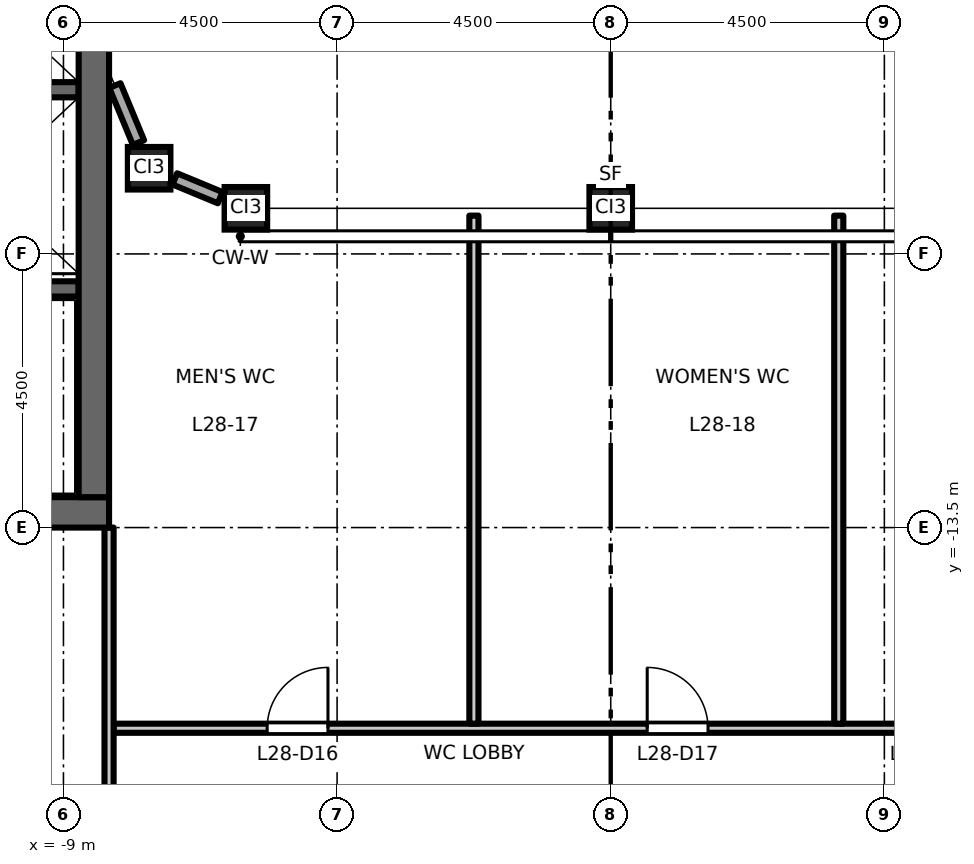
"""IFC4 building model, lengths in metres.
Left out: names, types, materials, properties, quantities, classifications, styles, units other than length and angle.
Written with IfcOpenShell. Run it as: python <this file> out.ifc"""

import sys

from ifc_helpers import new_model, si_unit, direction, frame, frame_2d, origin, origin_2d, place, context, subcontext, project, spatial, rectangle, hollow_rectangle, extrude, element, fill, save


model = new_model("IFC4")
c1 = context("Model", 3, precision=1e-05, world=origin(), true_north=direction((0.0, 1.0)))
c2 = subcontext(c1, "Body", "Model", "MODEL_VIEW")
j1 = project(units=[si_unit("LENGTHUNIT", "METRE"), si_unit("PLANEANGLEUNIT", "RADIAN")], contexts=[c1])
p1 = place(None, origin())
s1 = spatial("IfcSite", under=j1, at=p1, CompositionType="ELEMENT")
p2 = place(p1, origin())
s2 = spatial("IfcBuilding", under=s1, at=p2, CompositionType="ELEMENT")
p3 = place(p2, frame((0.0, 0.0, 131.7)))
s3 = spatial("IfcBuildingStorey", under=s2, at=p3, CompositionType="ELEMENT", Elevation=131.7)
for number, where, z_axis, x_axis in (
    (1, (-7.591, -7.591, 0.0), (0.0, 0.0, 1.0), (1.0, 0.0, 0.0)),
    (2, (-6.0, -8.25, 0.0), (0.0, 0.0, 1.0), (1.0, 0.0, 0.0)),
    (3, (0.0, -8.25, 0.0), (0.0, 0.0, 1.0), (1.0, 0.0, 0.0)),
):
    element("IfcColumn", number, at=place(p3, frame(where, z_axis=z_axis, x_axis=x_axis)), inside=s3, PredefinedType="COLUMN", context=c2, shape_type="SweptSolid", body=[
        extrude(hollow_rectangle(XDim=0.7, YDim=0.7, WallThickness=0.04, at=origin_2d()), origin(), (0.0, 0.0, 1.0), 4.5),
    ])
p4 = place(p3, frame((-8.75, -6.3, 0.0), z_axis=(0.0, 0.0, 1.0), x_axis=(-1.0, 0.0, 0.0)))
e4 = element("IfcWall", 4, at=p4, inside=s3, PredefinedType="SHEAR", context=c2, shape_type="SweptSolid", body=[
    extrude(rectangle(XDim=3.1, YDim=0.25, at=frame_2d((1.55, 0.0))), origin(), (0.0, 0.0, 1.0), 4.35),
])
p5 = place(p3, frame((-8.75, -9.575, 0.0), z_axis=(0.0, 0.0, 1.0), x_axis=(-1.0, 0.0, 0.0)))
e5 = element("IfcWall", 5, at=p5, inside=s3, PredefinedType="SHEAR", context=c2, shape_type="SweptSolid", body=[
    extrude(rectangle(XDim=8.0, YDim=0.25, at=frame_2d((4.0, 0.0))), origin(), (0.0, 0.0, 1.0), 4.35),
])
p6 = place(p5, frame((6.65, 0.0, 0.0)))
e6 = element("IfcOpeningElement", 6, at=p6, cuts=e5, PredefinedType="OPENING", context=c2, shape_type="SweptSolid", body=[
    extrude(rectangle(XDim=1.1, YDim=2.1, at=frame_2d((0.55, 1.05))), frame((0.0, 0.135, 0.0), z_axis=(0.0, -1.0, 0.0), x_axis=(1.0, 0.0, 0.0)), (0.0, 0.0, 1.0), 0.27),
])
p7 = place(p3, frame((-8.25, -13.25, 0.0), z_axis=(0.0, 0.0, 1.0), x_axis=(-1.0, 0.0, 0.0)))
e7 = element("IfcWall", 7, at=p7, inside=s3, PredefinedType="SHEAR", context=c2, shape_type="SweptSolid", body=[
    extrude(rectangle(XDim=13.5, YDim=0.5, at=frame_2d((6.75, 0.0))), origin(), (0.0, 0.0, 1.0), 4.35),
])
p8 = place(p3, frame((-8.5, -13.0, 0.0), z_axis=(0.0, 0.0, 1.0), x_axis=(0.0, 1.0, 0.0)))
e8 = element("IfcWall", 8, at=p8, inside=s3, PredefinedType="SHEAR", context=c2, shape_type="SweptSolid", body=[
    extrude(rectangle(XDim=26.0, YDim=0.5, at=frame_2d((13.0, 0.0))), origin(), (0.0, 0.0, 1.0), 4.35),
])
p9 = place(p3, frame((-8.154, -6.231, 0.0), z_axis=(0.0, 0.0, 1.0), x_axis=(0.382769662028, -0.923843810301, 0.0)))
e9 = element("IfcWall", 9, at=p9, inside=s3, PredefinedType="STANDARD", context=c2, shape_type="SweptSolid", body=[
    extrude(rectangle(XDim=1.015, YDim=0.2, at=frame_2d((0.507, 0.0))), origin(), (0.0, 0.0, 1.0), 3.826),
])
p10 = place(p3, frame((-7.168, -7.766, 0.0), z_axis=(0.0, 0.0, 1.0), x_axis=(0.923817771127, -0.382832503518, 0.0)))
e10 = element("IfcWall", 10, at=p10, inside=s3, PredefinedType="STANDARD", context=c2, shape_type="SweptSolid", body=[
    extrude(rectangle(XDim=0.807, YDim=0.2, at=frame_2d((0.404, 0.0))), origin(), (0.0, 0.0, 1.0), 3.826),
])
p11 = place(p3, frame((-8.175, -16.8, 0.0), z_axis=(0.0, 0.0, 1.0), x_axis=(1.0, 0.0, 0.0)))
e11 = element("IfcWall", 11, at=p11, inside=s3, PredefinedType="PARTITIONING", context=c2, shape_type="SweptSolid", body=[
    extrude(rectangle(XDim=14.835, YDim=0.15, at=frame_2d((7.417, 0.0))), origin(), (0.0, 0.0, 1.0), 4.35),
])
p12 = place(p11, frame((2.525, 0.0, 0.0)))
e12 = element("IfcOpeningElement", 12, at=p12, cuts=e11, PredefinedType="OPENING", context=c2, shape_type="SweptSolid", body=[
    extrude(rectangle(XDim=1.0, YDim=2.1, at=frame_2d((0.5, 1.05))), frame((0.0, 0.085, 0.0), z_axis=(0.0, -1.0, 0.0), x_axis=(1.0, 0.0, 0.0)), (0.0, 0.0, 1.0), 0.17),
])
p13 = place(p11, frame((8.775, 0.0, 0.0)))
e13 = element("IfcOpeningElement", 13, at=p13, cuts=e11, PredefinedType="OPENING", context=c2, shape_type="SweptSolid", body=[
    extrude(rectangle(XDim=1.0, YDim=2.1, at=frame_2d((0.5, 1.05))), frame((0.0, 0.085, 0.0), z_axis=(0.0, -1.0, 0.0), x_axis=(1.0, 0.0, 0.0)), (0.0, 0.0, 1.0), 0.17),
])
p14 = place(p11, frame((12.935, 0.0, 0.0)))
e14 = element("IfcOpeningElement", 14, at=p14, cuts=e11, PredefinedType="OPENING", context=c2, shape_type="SweptSolid", body=[
    extrude(rectangle(XDim=1.0, YDim=2.1, at=frame_2d((0.5, 1.05))), frame((0.0, 0.085, 0.0), z_axis=(0.0, -1.0, 0.0), x_axis=(1.0, 0.0, 0.0)), (0.0, 0.0, 1.0), 0.17),
])
p15 = place(p3, frame((-8.25, -18.925, 0.0), z_axis=(0.0, 0.0, 1.0), x_axis=(0.0, 1.0, 0.0)))
e15 = element("IfcWall", 15, at=p15, inside=s3, PredefinedType="PARTITIONING", context=c2, shape_type="SweptSolid", body=[
    extrude(rectangle(XDim=5.425, YDim=0.15, at=frame_2d((2.712, 0.0))), origin(), (0.0, 0.0, 1.0), 4.35),
])
for number, where, z_axis, x_axis in (
    (16, (-2.25, -16.725, 0.0), (0.0, 0.0, 1.0), (0.0, 1.0, 0.0)),
    (17, (3.75, -16.725, 0.0), (0.0, 0.0, 1.0), (0.0, 1.0, 0.0)),
):
    element("IfcWall", number, at=place(p3, frame(where, z_axis=z_axis, x_axis=x_axis)), inside=s3, PredefinedType="PARTITIONING", context=c2, shape_type="SweptSolid", body=[
        extrude(rectangle(XDim=8.355, YDim=0.15, at=frame_2d((4.177, 0.0))), origin(), (0.0, 0.0, 1.0), 4.35),
    ])
p16 = place(p12, origin())
e18 = element("IfcDoor", 18, at=p16, inside=s3, OperationType="SINGLE_SWING_RIGHT", PredefinedType="DOOR", context=c2, shape_type="SweptSolid", body=[
    extrude(rectangle(XDim=1.0, YDim=2.1, at=frame_2d((0.5, 1.05))), frame((0.0, 0.025, 0.0), z_axis=(0.0, -1.0, 0.0), x_axis=(1.0, 0.0, 0.0)), (0.0, 0.0, 1.0), 0.05),
])
fill(e12, e18)
p17 = place(p13, origin())
e19 = element("IfcDoor", 19, at=p17, inside=s3, OperationType="SINGLE_SWING_LEFT", PredefinedType="DOOR", context=c2, shape_type="SweptSolid", body=[
    extrude(rectangle(XDim=1.0, YDim=2.1, at=frame_2d((0.5, 1.05))), frame((0.0, 0.025, 0.0), z_axis=(0.0, -1.0, 0.0), x_axis=(1.0, 0.0, 0.0)), (0.0, 0.0, 1.0), 0.05),
])
fill(e13, e19)
save(model, sys.argv[1])
